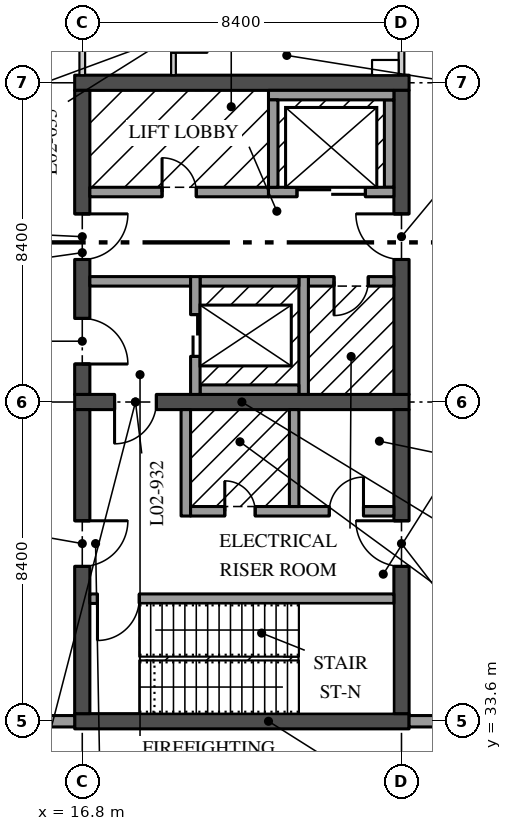
"""IFC4 building model, lengths in metres.
Left out: names, types, materials, properties, quantities, classifications, styles, units other than length and angle.
Written with IfcOpenShell. Run it as: python <this file> out.ifc"""

import sys

from ifc_helpers import new_model, si_unit, direction, frame, frame_2d, origin, place, context, subcontext, project, spatial, rectangle, extrude, element, fill, save


model = new_model("IFC4")
c1 = context("Model", 3, precision=1e-05, world=origin(), true_north=direction((0.0, 1.0)))
c2 = subcontext(c1, "Body", "Model", "MODEL_VIEW")
j1 = project(units=[si_unit("LENGTHUNIT", "METRE"), si_unit("PLANEANGLEUNIT", "RADIAN")], contexts=[c1])
p1 = place(None, origin())
s1 = spatial("IfcSite", under=j1, at=p1, CompositionType="ELEMENT")
p2 = place(p1, origin())
s2 = spatial("IfcBuilding", under=s1, at=p2, CompositionType="ELEMENT")
p3 = place(p2, frame((0.0, 0.0, 9.9)))
s3 = spatial("IfcBuildingStorey", under=s2, at=p3, CompositionType="ELEMENT", Elevation=9.9)
p4 = place(p3, frame((16.6, 42.0, 0.0), z_axis=(0.0, 0.0, 1.0), x_axis=(1.0, 0.0, 0.0)))
e1 = element("IfcWall", 1, at=p4, inside=s3, PredefinedType="SHEAR", context=c2, shape_type="SweptSolid", body=[
    extrude(rectangle(XDim=8.8, YDim=0.4, at=frame_2d((4.4, 0.0))), origin(), (0.0, 0.0, 1.0), 4.37),
])
p5 = place(p4, frame((1.05, 0.0, 0.0)))
e2 = element("IfcOpeningElement", 2, at=p5, cuts=e1, PredefinedType="OPENING", context=c2, shape_type="SweptSolid", body=[
    extrude(rectangle(XDim=1.1, YDim=2.1, at=frame_2d((0.55, 1.05))), frame((0.0, 0.21, 0.0), z_axis=(0.0, -1.0, 0.0), x_axis=(1.0, 0.0, 0.0)), (0.0, 0.0, 1.0), 0.42),
])
p6 = place(p3, frame((16.6, 50.4, 0.0), z_axis=(0.0, 0.0, 1.0), x_axis=(1.0, 0.0, 0.0)))
e3 = element("IfcWall", 3, at=p6, inside=s3, PredefinedType="SHEAR", context=c2, shape_type="SweptSolid", body=[
    extrude(rectangle(XDim=8.8, YDim=0.4, at=frame_2d((4.4, 0.0))), origin(), (0.0, 0.0, 1.0), 4.37),
])
p7 = place(p3, frame((16.8, 42.2, 0.0), z_axis=(0.0, 0.0, 1.0), x_axis=(0.0, 1.0, 0.0)))
e4 = element("IfcWall", 4, at=p7, inside=s3, PredefinedType="SHEAR", context=c2, shape_type="SweptSolid", body=[
    extrude(rectangle(XDim=8.0, YDim=0.4, at=frame_2d((4.0, 0.0))), origin(), (0.0, 0.0, 1.0), 4.37),
])
p8 = place(p7, frame((3.55, 0.0, 0.0)))
e5 = element("IfcOpeningElement", 5, at=p8, cuts=e4, PredefinedType="OPENING", context=c2, shape_type="SweptSolid", body=[
    extrude(rectangle(XDim=1.2, YDim=2.1, at=frame_2d((0.6, 1.05))), frame((0.0, 0.21, 0.0), z_axis=(0.0, -1.0, 0.0), x_axis=(1.0, 0.0, 0.0)), (0.0, 0.0, 1.0), 0.42),
])
p9 = place(p7, frame((0.8, 0.0, 0.0)))
e6 = element("IfcOpeningElement", 6, at=p9, cuts=e4, PredefinedType="OPENING", context=c2, shape_type="SweptSolid", body=[
    extrude(rectangle(XDim=1.2, YDim=2.1, at=frame_2d((0.6, 1.05))), frame((0.0, 0.21, 0.0), z_axis=(0.0, -1.0, 0.0), x_axis=(1.0, 0.0, 0.0)), (0.0, 0.0, 1.0), 0.42),
])
p10 = place(p3, frame((25.2, 42.2, 0.0), z_axis=(0.0, 0.0, 1.0), x_axis=(0.0, 1.0, 0.0)))
e7 = element("IfcWall", 7, at=p10, inside=s3, PredefinedType="SHEAR", context=c2, shape_type="SweptSolid", body=[
    extrude(rectangle(XDim=8.0, YDim=0.4, at=frame_2d((4.0, 0.0))), origin(), (0.0, 0.0, 1.0), 4.37),
])
p11 = place(p10, frame((3.55, 0.0, 0.0)))
e8 = element("IfcOpeningElement", 8, at=p11, cuts=e7, PredefinedType="OPENING", context=c2, shape_type="SweptSolid", body=[
    extrude(rectangle(XDim=1.2, YDim=2.1, at=frame_2d((0.6, 1.05))), frame((0.0, 0.21, 0.0), z_axis=(0.0, -1.0, 0.0), x_axis=(1.0, 0.0, 0.0)), (0.0, 0.0, 1.0), 0.42),
])
p12 = place(p3, frame((21.7, 47.525, 0.0), z_axis=(0.0, 0.0, 1.0), x_axis=(-1.0, 0.0, 0.0)))
e9 = element("IfcWall", 9, at=p12, inside=s3, PredefinedType="SOLIDWALL", context=c2, shape_type="SweptSolid", body=[
    extrude(rectangle(XDim=4.7, YDim=0.25, at=frame_2d((2.35, 0.0))), origin(), (0.0, 0.0, 1.0), 4.37),
])
p13 = place(p12, frame((1.9, 0.0, 0.0)))
e10 = element("IfcOpeningElement", 10, at=p13, cuts=e9, PredefinedType="OPENING", context=c2, shape_type="SweptSolid", body=[
    extrude(rectangle(XDim=0.9, YDim=2.1, at=frame_2d((0.45, 1.05))), frame((0.0, 0.135, 0.0), z_axis=(0.0, -1.0, 0.0), x_axis=(1.0, 0.0, 0.0)), (0.0, 0.0, 1.0), 0.27),
])
p14 = place(p3, frame((25.0, 45.175, 0.0), z_axis=(0.0, 0.0, 1.0), x_axis=(-1.0, 0.0, 0.0)))
e11 = element("IfcWall", 11, at=p14, inside=s3, PredefinedType="SOLIDWALL", context=c2, shape_type="SweptSolid", body=[
    extrude(rectangle(XDim=2.25, YDim=0.25, at=frame_2d((1.125, 0.0))), origin(), (0.0, 0.0, 1.0), 4.37),
])
p15 = place(p14, frame((0.675, 0.0, 0.0)))
e12 = element("IfcOpeningElement", 12, at=p15, cuts=e11, PredefinedType="OPENING", context=c2, shape_type="SweptSolid", body=[
    extrude(rectangle(XDim=0.9, YDim=2.1, at=frame_2d((0.45, 1.05))), frame((0.0, 0.135, 0.0), z_axis=(0.0, -1.0, 0.0), x_axis=(1.0, 0.0, 0.0)), (0.0, 0.0, 1.0), 0.27),
])
p16 = place(p3, frame((19.65, 45.175, 0.0), z_axis=(0.0, 0.0, 1.0), x_axis=(-1.0, 0.0, 0.0)))
e13 = element("IfcWall", 13, at=p16, inside=s3, PredefinedType="SOLIDWALL", context=c2, shape_type="SweptSolid", body=[
    extrude(rectangle(XDim=2.65, YDim=0.25, at=frame_2d((1.325, 0.0))), origin(), (0.0, 0.0, 1.0), 4.37),
])
p17 = place(p3, frame((16.6, 33.6, 0.0), z_axis=(0.0, 0.0, 1.0), x_axis=(1.0, 0.0, 0.0)))
e14 = element("IfcWall", 14, at=p17, inside=s3, PredefinedType="SHEAR", context=c2, shape_type="SweptSolid", body=[
    extrude(rectangle(XDim=8.8, YDim=0.4, at=frame_2d((4.4, 0.0))), origin(), (0.0, 0.0, 1.0), 4.37),
])
p18 = place(p3, frame((16.8, 33.8, 0.0), z_axis=(0.0, 0.0, 1.0), x_axis=(0.0, 1.0, 0.0)))
e15 = element("IfcWall", 15, at=p18, inside=s3, PredefinedType="SHEAR", context=c2, shape_type="SweptSolid", body=[
    extrude(rectangle(XDim=8.0, YDim=0.4, at=frame_2d((4.0, 0.0))), origin(), (0.0, 0.0, 1.0), 4.37),
])
p19 = place(p18, frame((3.875, 0.0, 0.0)))
e16 = element("IfcOpeningElement", 16, at=p19, cuts=e15, PredefinedType="OPENING", context=c2, shape_type="SweptSolid", body=[
    extrude(rectangle(XDim=1.2, YDim=2.1, at=frame_2d((0.6, 1.05))), frame((0.0, 0.21, 0.0), z_axis=(0.0, -1.0, 0.0), x_axis=(1.0, 0.0, 0.0)), (0.0, 0.0, 1.0), 0.42),
])
p20 = place(p3, frame((25.2, 33.8, 0.0), z_axis=(0.0, 0.0, 1.0), x_axis=(0.0, 1.0, 0.0)))
e17 = element("IfcWall", 17, at=p20, inside=s3, PredefinedType="SHEAR", context=c2, shape_type="SweptSolid", body=[
    extrude(rectangle(XDim=8.0, YDim=0.4, at=frame_2d((4.0, 0.0))), origin(), (0.0, 0.0, 1.0), 4.37),
])
p21 = place(p20, frame((3.875, 0.0, 0.0)))
e18 = element("IfcOpeningElement", 18, at=p21, cuts=e17, PredefinedType="OPENING", context=c2, shape_type="SweptSolid", body=[
    extrude(rectangle(XDim=1.2, YDim=2.1, at=frame_2d((0.6, 1.05))), frame((0.0, 0.21, 0.0), z_axis=(0.0, -1.0, 0.0), x_axis=(1.0, 0.0, 0.0)), (0.0, 0.0, 1.0), 0.42),
])
p22 = place(p3, frame((17.0, 36.825, 0.0), z_axis=(0.0, 0.0, 1.0), x_axis=(1.0, 0.0, 0.0)))
e19 = element("IfcWall", 19, at=p22, inside=s3, PredefinedType="SOLIDWALL", context=c2, shape_type="SweptSolid", body=[
    extrude(rectangle(XDim=8.0, YDim=0.25, at=frame_2d((4.0, 0.0))), origin(), (0.0, 0.0, 1.0), 4.37),
])
p23 = place(p22, frame((0.2, 0.0, 0.0)))
e20 = element("IfcOpeningElement", 20, at=p23, cuts=e19, PredefinedType="OPENING", context=c2, shape_type="SweptSolid", body=[
    extrude(rectangle(XDim=1.1, YDim=2.1, at=frame_2d((0.55, 1.05))), frame((0.0, 0.135, 0.0), z_axis=(0.0, -1.0, 0.0), x_axis=(1.0, 0.0, 0.0)), (0.0, 0.0, 1.0), 0.27),
])
p24 = place(p3, frame((19.525, 39.0, 0.0), z_axis=(0.0, 0.0, 1.0), x_axis=(0.0, 1.0, 0.0)))
e21 = element("IfcWall", 21, at=p24, inside=s3, PredefinedType="SOLIDWALL", context=c2, shape_type="SweptSolid", body=[
    extrude(rectangle(XDim=2.8, YDim=0.25, at=frame_2d((1.4, 0.0))), origin(), (0.0, 0.0, 1.0), 4.37),
])
p25 = place(p3, frame((19.65, 39.125, 0.0), z_axis=(0.0, 0.0, 1.0), x_axis=(1.0, 0.0, 0.0)))
e22 = element("IfcWall", 22, at=p25, inside=s3, PredefinedType="SOLIDWALL", context=c2, shape_type="SweptSolid", body=[
    extrude(rectangle(XDim=5.35, YDim=0.25, at=frame_2d((2.675, 0.0))), origin(), (0.0, 0.0, 1.0), 4.37),
])
p26 = place(p25, frame((3.65, 0.0, 0.0)))
e23 = element("IfcOpeningElement", 23, at=p26, cuts=e22, PredefinedType="OPENING", context=c2, shape_type="SweptSolid", body=[
    extrude(rectangle(XDim=0.9, YDim=2.1, at=frame_2d((0.45, 1.05))), frame((0.0, 0.135, 0.0), z_axis=(0.0, -1.0, 0.0), x_axis=(1.0, 0.0, 0.0)), (0.0, 0.0, 1.0), 0.27),
])
p27 = place(p25, frame((0.9, 0.0, 0.0)))
e24 = element("IfcOpeningElement", 24, at=p27, cuts=e22, PredefinedType="OPENING", context=c2, shape_type="SweptSolid", body=[
    extrude(rectangle(XDim=0.8, YDim=2.1, at=frame_2d((0.4, 1.05))), frame((0.0, 0.135, 0.0), z_axis=(0.0, -1.0, 0.0), x_axis=(1.0, 0.0, 0.0)), (0.0, 0.0, 1.0), 0.27),
])
p28 = place(p3, frame((22.375, 39.25, 0.0), z_axis=(0.0, 0.0, 1.0), x_axis=(0.0, 1.0, 0.0)))
e25 = element("IfcWall", 25, at=p28, inside=s3, PredefinedType="SOLIDWALL", context=c2, shape_type="SweptSolid", body=[
    extrude(rectangle(XDim=2.55, YDim=0.25, at=frame_2d((1.275, 0.0))), origin(), (0.0, 0.0, 1.0), 4.37),
])
p29 = place(p3, frame((24.875, 47.65, 0.0), z_axis=(0.0, 0.0, 1.0), x_axis=(0.0, 1.0, 0.0)))
e26 = element("IfcWall", 26, at=p29, inside=s3, PredefinedType="SOLIDWALL", context=c2, shape_type="SweptSolid", body=[
    extrude(rectangle(XDim=2.3, YDim=0.25, at=frame_2d((1.15, 0.0))), origin(), (0.0, 0.0, 1.0), 4.37),
])
p30 = place(p3, frame((21.7, 50.075, 0.0), z_axis=(0.0, 0.0, 1.0), x_axis=(1.0, 0.0, 0.0)))
e27 = element("IfcWall", 27, at=p30, inside=s3, PredefinedType="SOLIDWALL", context=c2, shape_type="SweptSolid", body=[
    extrude(rectangle(XDim=3.3, YDim=0.25, at=frame_2d((1.65, 0.0))), origin(), (0.0, 0.0, 1.0), 4.37),
])
p31 = place(p3, frame((21.7, 47.525, 0.0), z_axis=(0.0, 0.0, 1.0), x_axis=(1.0, 0.0, 0.0)))
e28 = element("IfcWall", 28, at=p31, inside=s3, PredefinedType="SOLIDWALL", context=c2, shape_type="SweptSolid", body=[
    extrude(rectangle(XDim=3.3, YDim=0.25, at=frame_2d((1.65, 0.0))), origin(), (0.0, 0.0, 1.0), 4.37),
])
p32 = place(p31, frame((0.75, 0.0, 0.0)))
e29 = element("IfcOpeningElement", 29, at=p32, cuts=e28, PredefinedType="OPENING", context=c2, shape_type="SweptSolid", body=[
    extrude(rectangle(XDim=1.8, YDim=2.1, at=frame_2d((0.9, 1.05))), frame((0.0, 0.135, 0.0), z_axis=(0.0, -1.0, 0.0), x_axis=(1.0, 0.0, 0.0)), (0.0, 0.0, 1.0), 0.27),
])
p33 = place(p3, frame((21.825, 47.65, 0.0), z_axis=(0.0, 0.0, 1.0), x_axis=(0.0, 1.0, 0.0)))
e30 = element("IfcWall", 30, at=p33, inside=s3, PredefinedType="SOLIDWALL", context=c2, shape_type="SweptSolid", body=[
    extrude(rectangle(XDim=2.3, YDim=0.25, at=frame_2d((1.15, 0.0))), origin(), (0.0, 0.0, 1.0), 4.37),
])
p34 = place(p3, frame((22.625, 42.2, 0.0), z_axis=(0.0, 0.0, 1.0), x_axis=(0.0, 1.0, 0.0)))
e31 = element("IfcWall", 31, at=p34, inside=s3, PredefinedType="SOLIDWALL", context=c2, shape_type="SweptSolid", body=[
    extrude(rectangle(XDim=3.1, YDim=0.25, at=frame_2d((1.55, 0.0))), origin(), (0.0, 0.0, 1.0), 4.37),
])
for number, where, z_axis, x_axis in (
    (32, (19.9, 45.175, 0.0), (0.0, 0.0, 1.0), (1.0, 0.0, 0.0)),
    (33, (19.9, 42.325, 0.0), (0.0, 0.0, 1.0), (1.0, 0.0, 0.0)),
):
    element("IfcWall", number, at=place(p3, frame(where, z_axis=z_axis, x_axis=x_axis)), inside=s3, PredefinedType="SOLIDWALL", context=c2, shape_type="SweptSolid", body=[
        extrude(rectangle(XDim=2.6, YDim=0.25, at=frame_2d((1.3, 0.0))), origin(), (0.0, 0.0, 1.0), 4.37),
    ])
p35 = place(p3, frame((19.775, 42.2, 0.0), z_axis=(0.0, 0.0, 1.0), x_axis=(0.0, 1.0, 0.0)))
e34 = element("IfcWall", 34, at=p35, inside=s3, PredefinedType="SOLIDWALL", context=c2, shape_type="SweptSolid", body=[
    extrude(rectangle(XDim=3.1, YDim=0.25, at=frame_2d((1.55, 0.0))), origin(), (0.0, 0.0, 1.0), 4.37),
])
p36 = place(p35, frame((1.0, 0.0, 0.0)))
e35 = element("IfcOpeningElement", 35, at=p36, cuts=e34, PredefinedType="OPENING", context=c2, shape_type="SweptSolid", body=[
    extrude(rectangle(XDim=1.1, YDim=2.1, at=frame_2d((0.55, 1.05))), frame((0.0, 0.135, 0.0), z_axis=(0.0, -1.0, 0.0), x_axis=(1.0, 0.0, 0.0)), (0.0, 0.0, 1.0), 0.27),
])
p37 = place(p3, frame((25.2, 50.6, 0.0), z_axis=(0.0, 0.0, 1.0), x_axis=(0.0, 1.0, 0.0)))
e36 = element("IfcWall", 36, at=p37, inside=s3, PredefinedType="PARTITIONING", context=c2, shape_type="SweptSolid", body=[
    extrude(rectangle(XDim=2.8, YDim=0.15, at=frame_2d((1.4, 0.0))), origin(), (0.0, 0.0, 1.0), 3.746),
])
p38 = place(p3, frame((16.8, 50.6, 0.0), z_axis=(0.0, 0.0, 1.0), x_axis=(0.0, 1.0, 0.0)))
e37 = element("IfcWall", 37, at=p38, inside=s3, PredefinedType="PARTITIONING", context=c2, shape_type="SweptSolid", body=[
    extrude(rectangle(XDim=8.0, YDim=0.15, at=frame_2d((4.0, 0.0))), origin(), (0.0, 0.0, 1.0), 3.746),
])
p39 = place(p38, frame((2.35, 0.0, 0.0)))
e38 = element("IfcOpeningElement", 38, at=p39, cuts=e37, PredefinedType="OPENING", context=c2, shape_type="SweptSolid", body=[
    extrude(rectangle(XDim=0.9, YDim=2.1, at=frame_2d((0.45, 1.05))), frame((0.0, 0.085, 0.0), z_axis=(0.0, -1.0, 0.0), x_axis=(1.0, 0.0, 0.0)), (0.0, 0.0, 1.0), 0.17),
])
p40 = place(p3, frame((19.2, 50.6, 0.0), z_axis=(0.0, 0.0, 1.0), x_axis=(0.0, 1.0, 0.0)))
e39 = element("IfcWall", 39, at=p40, inside=s3, PredefinedType="PARTITIONING", context=c2, shape_type="SweptSolid", body=[
    extrude(rectangle(XDim=2.8, YDim=0.125, at=frame_2d((1.4, 0.0))), origin(), (0.0, 0.0, 1.0), 4.37),
])
p41 = place(p40, frame((0.6, 0.0, 0.0)))
e40 = element("IfcOpeningElement", 40, at=p41, cuts=e39, PredefinedType="OPENING", context=c2, shape_type="SweptSolid", body=[
    extrude(rectangle(XDim=0.9, YDim=2.1, at=frame_2d((0.45, 1.05))), frame((0.0, 0.073, 0.0), z_axis=(0.0, -1.0, 0.0), x_axis=(1.0, 0.0, 0.0)), (0.0, 0.0, 1.0), 0.145),
])
p42 = place(p3, frame((33.598, 33.6, 0.0), z_axis=(0.0, 0.0, 1.0), x_axis=(-1.0, 0.0, 0.0)))
e41 = element("IfcWall", 41, at=p42, inside=s3, PredefinedType="SOLIDWALL", context=c2, shape_type="SweptSolid", body=[
    extrude(rectangle(XDim=8.198, YDim=0.3, at=frame_2d((4.099, 0.0))), origin(), (0.0, 0.0, 1.0), 3.746),
])
p43 = place(p3, frame((16.6, 33.6, 0.0), z_axis=(0.0, 0.0, 1.0), x_axis=(-1.0, 0.0, 0.0)))
e42 = element("IfcWall", 42, at=p43, inside=s3, PredefinedType="SOLIDWALL", context=c2, shape_type="SweptSolid", body=[
    extrude(rectangle(XDim=8.196, YDim=0.3, at=frame_2d((4.098, 0.0))), origin(), (0.0, 0.0, 1.0), 3.746),
])
p44 = place(p8, frame((1.2, 0.0, 0.0), z_axis=(0.0, 0.0, 1.0), x_axis=(-1.0, 0.0, 0.0)))
e43 = element("IfcDoor", 43, at=p44, inside=s3, OperationType="SINGLE_SWING_RIGHT", PredefinedType="DOOR", context=c2, shape_type="SweptSolid", body=[
    extrude(rectangle(XDim=1.2, YDim=2.1, at=frame_2d((0.6, 1.05))), frame((0.0, 0.035, 0.0), z_axis=(0.0, -1.0, 0.0), x_axis=(1.0, 0.0, 0.0)), (0.0, 0.0, 1.0), 0.07),
])
fill(e5, e43)
p45 = place(p11, origin())
e44 = element("IfcDoor", 44, at=p45, inside=s3, OperationType="SINGLE_SWING_LEFT", PredefinedType="DOOR", context=c2, shape_type="SweptSolid", body=[
    extrude(rectangle(XDim=1.2, YDim=2.1, at=frame_2d((0.6, 1.05))), frame((0.0, 0.035, 0.0), z_axis=(0.0, -1.0, 0.0), x_axis=(1.0, 0.0, 0.0)), (0.0, 0.0, 1.0), 0.07),
])
fill(e8, e44)
p46 = place(p9, frame((1.2, 0.0, 0.0), z_axis=(0.0, 0.0, 1.0), x_axis=(-1.0, 0.0, 0.0)))
e45 = element("IfcDoor", 45, at=p46, inside=s3, OperationType="SINGLE_SWING_LEFT", PredefinedType="DOOR", context=c2, shape_type="SweptSolid", body=[
    extrude(rectangle(XDim=1.2, YDim=2.1, at=frame_2d((0.6, 1.05))), frame((0.0, 0.035, 0.0), z_axis=(0.0, -1.0, 0.0), x_axis=(1.0, 0.0, 0.0)), (0.0, 0.0, 1.0), 0.07),
])
fill(e6, e45)
p47 = place(p5, frame((1.1, 0.0, 0.0), z_axis=(0.0, 0.0, 1.0), x_axis=(-1.0, 0.0, 0.0)))
e46 = element("IfcDoor", 46, at=p47, inside=s3, OperationType="SINGLE_SWING_LEFT", PredefinedType="DOOR", context=c2, shape_type="SweptSolid", body=[
    extrude(rectangle(XDim=1.1, YDim=2.1, at=frame_2d((0.55, 1.05))), frame((0.0, 0.035, 0.0), z_axis=(0.0, -1.0, 0.0), x_axis=(1.0, 0.0, 0.0)), (0.0, 0.0, 1.0), 0.07),
])
fill(e2, e46)
p48 = place(p13, frame((0.9, 0.0, 0.0), z_axis=(0.0, 0.0, 1.0), x_axis=(-1.0, 0.0, 0.0)))
e47 = element("IfcDoor", 47, at=p48, inside=s3, OperationType="SINGLE_SWING_RIGHT", PredefinedType="DOOR", context=c2, shape_type="SweptSolid", body=[
    extrude(rectangle(XDim=0.9, YDim=2.1, at=frame_2d((0.45, 1.05))), frame((0.0, 0.035, 0.0), z_axis=(0.0, -1.0, 0.0), x_axis=(1.0, 0.0, 0.0)), (0.0, 0.0, 1.0), 0.07),
])
fill(e10, e47)
p49 = place(p15, origin())
e48 = element("IfcDoor", 48, at=p49, inside=s3, OperationType="SINGLE_SWING_LEFT", PredefinedType="DOOR", context=c2, shape_type="SweptSolid", body=[
    extrude(rectangle(XDim=0.9, YDim=2.1, at=frame_2d((0.45, 1.05))), frame((0.0, 0.05, 0.0), z_axis=(0.0, -1.0, 0.0), x_axis=(1.0, 0.0, 0.0)), (0.0, 0.0, 1.0), 0.1),
])
fill(e12, e48)
p50 = place(p26, origin())
e49 = element("IfcDoor", 49, at=p50, inside=s3, OperationType="SINGLE_SWING_LEFT", PredefinedType="DOOR", context=c2, shape_type="SweptSolid", body=[
    extrude(rectangle(XDim=0.9, YDim=2.1, at=frame_2d((0.45, 1.05))), frame((0.0, 0.035, 0.0), z_axis=(0.0, -1.0, 0.0), x_axis=(1.0, 0.0, 0.0)), (0.0, 0.0, 1.0), 0.07),
])
fill(e23, e49)
p51 = place(p19, frame((1.2, 0.0, 0.0), z_axis=(0.0, 0.0, 1.0), x_axis=(-1.0, 0.0, 0.0)))
e50 = element("IfcDoor", 50, at=p51, inside=s3, OperationType="SINGLE_SWING_RIGHT", PredefinedType="DOOR", context=c2, shape_type="SweptSolid", body=[
    extrude(rectangle(XDim=1.2, YDim=2.1, at=frame_2d((0.6, 1.05))), frame((0.0, 0.035, 0.0), z_axis=(0.0, -1.0, 0.0), x_axis=(1.0, 0.0, 0.0)), (0.0, 0.0, 1.0), 0.07),
])
fill(e16, e50)
p52 = place(p21, origin())
e51 = element("IfcDoor", 51, at=p52, inside=s3, OperationType="SINGLE_SWING_LEFT", PredefinedType="DOOR", context=c2, shape_type="SweptSolid", body=[
    extrude(rectangle(XDim=1.2, YDim=2.1, at=frame_2d((0.6, 1.05))), frame((0.0, 0.035, 0.0), z_axis=(0.0, -1.0, 0.0), x_axis=(1.0, 0.0, 0.0)), (0.0, 0.0, 1.0), 0.07),
])
fill(e18, e51)
p53 = place(p27, origin())
e52 = element("IfcDoor", 52, at=p53, inside=s3, OperationType="SINGLE_SWING_RIGHT", PredefinedType="DOOR", context=c2, shape_type="SweptSolid", body=[
    extrude(rectangle(XDim=0.8, YDim=2.1, at=frame_2d((0.4, 1.05))), frame((0.0, 0.035, 0.0), z_axis=(0.0, -1.0, 0.0), x_axis=(1.0, 0.0, 0.0)), (0.0, 0.0, 1.0), 0.07),
])
fill(e24, e52)
p54 = place(p23, frame((1.1, 0.0, 0.0), z_axis=(0.0, 0.0, 1.0), x_axis=(-1.0, 0.0, 0.0)))
e53 = element("IfcDoor", 53, at=p54, inside=s3, OperationType="SINGLE_SWING_LEFT", PredefinedType="DOOR", context=c2, shape_type="SweptSolid", body=[
    extrude(rectangle(XDim=1.1, YDim=2.1, at=frame_2d((0.55, 1.05))), frame((0.0, 0.035, 0.0), z_axis=(0.0, -1.0, 0.0), x_axis=(1.0, 0.0, 0.0)), (0.0, 0.0, 1.0), 0.07),
])
fill(e20, e53)
p55 = place(p32, origin())
e54 = element("IfcDoor", 54, at=p55, inside=s3, OperationType="DOUBLE_DOOR_SLIDING", PredefinedType="DOOR", context=c2, shape_type="SweptSolid", body=[
    extrude(rectangle(XDim=1.8, YDim=2.1, at=frame_2d((0.9, 1.05))), frame((0.0, 0.04, 0.0), z_axis=(0.0, -1.0, 0.0), x_axis=(1.0, 0.0, 0.0)), (0.0, 0.0, 1.0), 0.08),
])
fill(e29, e54)
p56 = place(p36, origin())
e55 = element("IfcDoor", 55, at=p56, inside=s3, OperationType="DOUBLE_DOOR_SLIDING", PredefinedType="DOOR", context=c2, shape_type="SweptSolid", body=[
    extrude(rectangle(XDim=1.1, YDim=2.1, at=frame_2d((0.55, 1.05))), frame((0.0, 0.04, 0.0), z_axis=(0.0, -1.0, 0.0), x_axis=(1.0, 0.0, 0.0)), (0.0, 0.0, 1.0), 0.08),
])
fill(e35, e55)
save(model, sys.argv[1])
